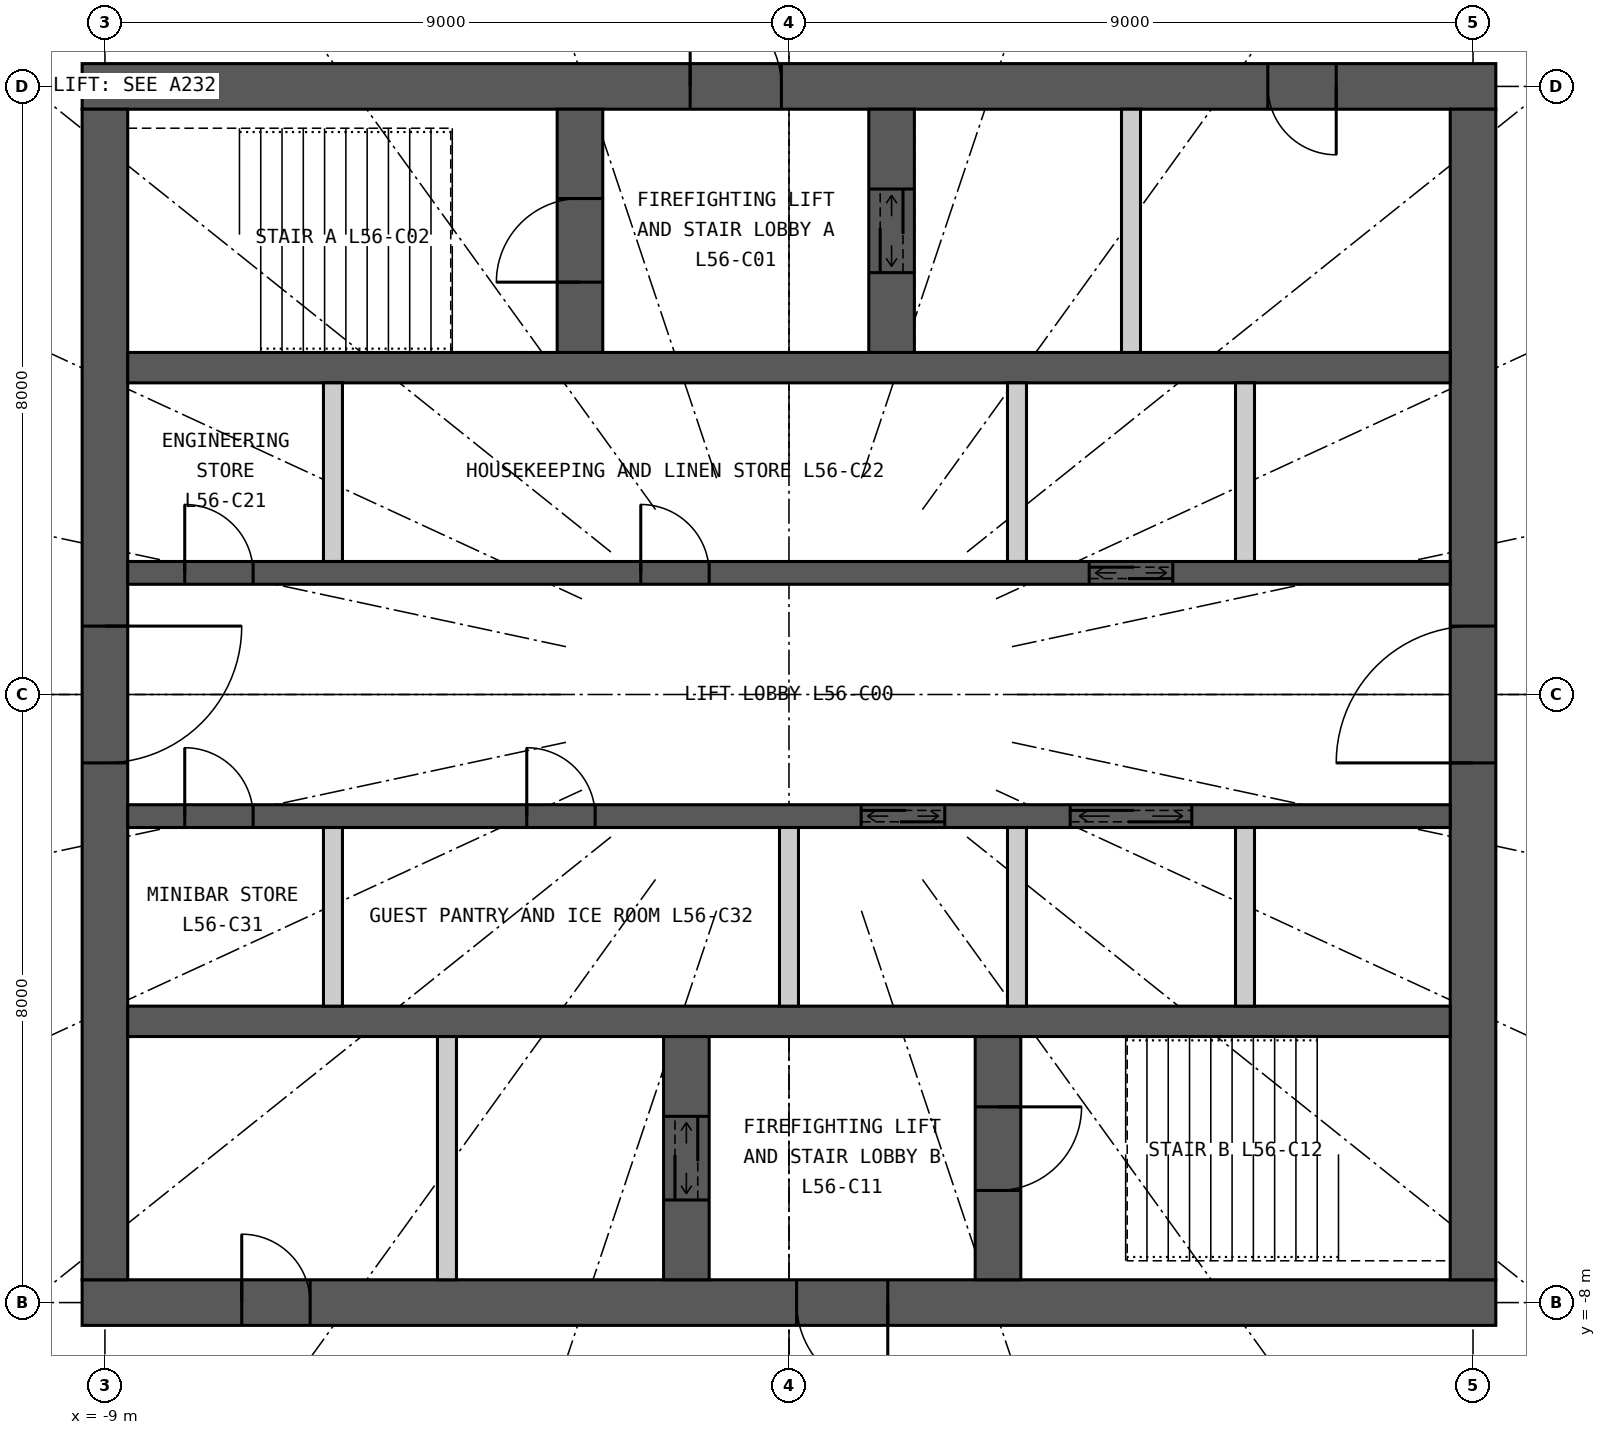
"""IFC4 building model, lengths in metres.
Left out: names, types, materials, properties, quantities, classifications, styles, units other than length and angle.
Written with IfcOpenShell. Run it as: python <this file> out.ifc"""

import sys

from ifc_helpers import new_model, si_unit, direction, frame, frame_2d, origin, place, context, subcontext, project, spatial, rectangle, extrude, element, fill, save


model = new_model("IFC4")
c1 = context("Model", 3, precision=1e-05, world=origin(), true_north=direction((0.0, 1.0)))
c2 = subcontext(c1, "Body", "Model", "MODEL_VIEW")
j1 = project(units=[si_unit("LENGTHUNIT", "METRE"), si_unit("PLANEANGLEUNIT", "RADIAN")], contexts=[c1])
p1 = place(None, origin())
s1 = spatial("IfcSite", under=j1, at=p1, CompositionType="ELEMENT")
p2 = place(p1, origin())
s2 = spatial("IfcBuilding", under=s1, at=p2, CompositionType="ELEMENT")
p3 = place(p2, frame((0.0, 0.0, 209.4)))
s3 = spatial("IfcBuildingStorey", under=s2, at=p3, CompositionType="ELEMENT", Elevation=209.4)
p4 = place(p3, frame((-9.3, 8.0, 0.0), z_axis=(0.0, 0.0, 1.0), x_axis=(1.0, 0.0, 0.0)))
e1 = element("IfcWall", 1, at=p4, inside=s3, PredefinedType="SHEAR", context=c2, shape_type="SweptSolid", body=[
    extrude(rectangle(XDim=18.6, YDim=0.6, at=frame_2d((9.3, 0.0))), origin(), (0.0, 0.0, 1.0), 3.3),
])
p5 = place(p4, frame((8.0, 0.0, 0.0)))
e2 = element("IfcOpeningElement", 2, at=p5, cuts=e1, PredefinedType="OPENING", context=c2, shape_type="SweptSolid", body=[
    extrude(rectangle(XDim=1.2, YDim=2.2, at=frame_2d((0.6, 1.1))), frame((0.0, 0.31, 0.0), z_axis=(0.0, -1.0, 0.0), x_axis=(1.0, 0.0, 0.0)), (0.0, 0.0, 1.0), 0.62),
])
p6 = place(p4, frame((15.6, 0.0, 0.0)))
e3 = element("IfcOpeningElement", 3, at=p6, cuts=e1, PredefinedType="OPENING", context=c2, shape_type="SweptSolid", body=[
    extrude(rectangle(XDim=0.9, YDim=2.2, at=frame_2d((0.45, 1.1))), frame((0.0, 0.31, 0.0), z_axis=(0.0, -1.0, 0.0), x_axis=(1.0, 0.0, 0.0)), (0.0, 0.0, 1.0), 0.62),
])
p7 = place(p3, frame((9.3, -8.0, 0.0), z_axis=(0.0, 0.0, 1.0), x_axis=(-1.0, 0.0, 0.0)))
e4 = element("IfcWall", 4, at=p7, inside=s3, PredefinedType="SHEAR", context=c2, shape_type="SweptSolid", body=[
    extrude(rectangle(XDim=18.6, YDim=0.6, at=frame_2d((9.3, 0.0))), origin(), (0.0, 0.0, 1.0), 3.3),
])
p8 = place(p7, frame((8.0, 0.0, 0.0)))
e5 = element("IfcOpeningElement", 5, at=p8, cuts=e4, PredefinedType="OPENING", context=c2, shape_type="SweptSolid", body=[
    extrude(rectangle(XDim=1.2, YDim=2.2, at=frame_2d((0.6, 1.1))), frame((0.0, 0.31, 0.0), z_axis=(0.0, -1.0, 0.0), x_axis=(1.0, 0.0, 0.0)), (0.0, 0.0, 1.0), 0.62),
])
p9 = place(p7, frame((15.6, 0.0, 0.0)))
e6 = element("IfcOpeningElement", 6, at=p9, cuts=e4, PredefinedType="OPENING", context=c2, shape_type="SweptSolid", body=[
    extrude(rectangle(XDim=0.9, YDim=2.2, at=frame_2d((0.45, 1.1))), frame((0.0, 0.31, 0.0), z_axis=(0.0, -1.0, 0.0), x_axis=(1.0, 0.0, 0.0)), (0.0, 0.0, 1.0), 0.62),
])
p10 = place(p3, frame((9.0, -7.7, 0.0), z_axis=(0.0, 0.0, 1.0), x_axis=(0.0, 1.0, 0.0)))
e7 = element("IfcWall", 7, at=p10, inside=s3, PredefinedType="SHEAR", context=c2, shape_type="SweptSolid", body=[
    extrude(rectangle(XDim=15.4, YDim=0.6, at=frame_2d((7.7, 0.0))), origin(), (0.0, 0.0, 1.0), 3.3),
])
p11 = place(p10, frame((6.8, 0.0, 0.0)))
e8 = element("IfcOpeningElement", 8, at=p11, cuts=e7, PredefinedType="OPENING", context=c2, shape_type="SweptSolid", body=[
    extrude(rectangle(XDim=1.8, YDim=2.2, at=frame_2d((0.9, 1.1))), frame((0.0, 0.31, 0.0), z_axis=(0.0, -1.0, 0.0), x_axis=(1.0, 0.0, 0.0)), (0.0, 0.0, 1.0), 0.62),
])
p12 = place(p3, frame((-9.0, 7.7, 0.0), z_axis=(0.0, 0.0, 1.0), x_axis=(0.0, -1.0, 0.0)))
e9 = element("IfcWall", 9, at=p12, inside=s3, PredefinedType="SHEAR", context=c2, shape_type="SweptSolid", body=[
    extrude(rectangle(XDim=15.4, YDim=0.6, at=frame_2d((7.7, 0.0))), origin(), (0.0, 0.0, 1.0), 3.3),
])
p13 = place(p12, frame((6.8, 0.0, 0.0)))
e10 = element("IfcOpeningElement", 10, at=p13, cuts=e9, PredefinedType="OPENING", context=c2, shape_type="SweptSolid", body=[
    extrude(rectangle(XDim=1.8, YDim=2.2, at=frame_2d((0.9, 1.1))), frame((0.0, 0.31, 0.0), z_axis=(0.0, -1.0, 0.0), x_axis=(1.0, 0.0, 0.0)), (0.0, 0.0, 1.0), 0.62),
])
p14 = place(p3, frame((-8.7, 4.3, 0.0), z_axis=(0.0, 0.0, 1.0), x_axis=(1.0, 0.0, 0.0)))
e11 = element("IfcWall", 11, at=p14, inside=s3, PredefinedType="SHEAR", context=c2, shape_type="SweptSolid", body=[
    extrude(rectangle(XDim=17.4, YDim=0.4, at=frame_2d((8.7, 0.0))), origin(), (0.0, 0.0, 1.0), 3.3),
])
p15 = place(p3, frame((-8.7, 1.6, 0.0), z_axis=(0.0, 0.0, 1.0), x_axis=(1.0, 0.0, 0.0)))
e12 = element("IfcWall", 12, at=p15, inside=s3, PredefinedType="SHEAR", context=c2, shape_type="SweptSolid", body=[
    extrude(rectangle(XDim=17.4, YDim=0.3, at=frame_2d((8.7, 0.0))), origin(), (0.0, 0.0, 1.0), 3.3),
])
p16 = place(p15, frame((12.65, 0.0, 0.0)))
e13 = element("IfcOpeningElement", 13, at=p16, cuts=e12, PredefinedType="OPENING", context=c2, shape_type="SweptSolid", body=[
    extrude(rectangle(XDim=1.1, YDim=2.2, at=frame_2d((0.55, 1.1))), frame((0.0, 0.16, 0.0), z_axis=(0.0, -1.0, 0.0), x_axis=(1.0, 0.0, 0.0)), (0.0, 0.0, 1.0), 0.32),
])
p17 = place(p15, frame((0.75, 0.0, 0.0)))
e14 = element("IfcOpeningElement", 14, at=p17, cuts=e12, PredefinedType="OPENING", context=c2, shape_type="SweptSolid", body=[
    extrude(rectangle(XDim=0.9, YDim=2.2, at=frame_2d((0.45, 1.1))), frame((0.0, 0.16, 0.0), z_axis=(0.0, -1.0, 0.0), x_axis=(1.0, 0.0, 0.0)), (0.0, 0.0, 1.0), 0.32),
])
p18 = place(p15, frame((6.75, 0.0, 0.0)))
e15 = element("IfcOpeningElement", 15, at=p18, cuts=e12, PredefinedType="OPENING", context=c2, shape_type="SweptSolid", body=[
    extrude(rectangle(XDim=0.9, YDim=2.2, at=frame_2d((0.45, 1.1))), frame((0.0, 0.16, 0.0), z_axis=(0.0, -1.0, 0.0), x_axis=(1.0, 0.0, 0.0)), (0.0, 0.0, 1.0), 0.32),
])
p19 = place(p3, frame((-8.7, -4.3, 0.0), z_axis=(0.0, 0.0, 1.0), x_axis=(1.0, 0.0, 0.0)))
e16 = element("IfcWall", 16, at=p19, inside=s3, PredefinedType="SHEAR", context=c2, shape_type="SweptSolid", body=[
    extrude(rectangle(XDim=17.4, YDim=0.4, at=frame_2d((8.7, 0.0))), origin(), (0.0, 0.0, 1.0), 3.3),
])
p20 = place(p3, frame((-8.7, -1.6, 0.0), z_axis=(0.0, 0.0, 1.0), x_axis=(1.0, 0.0, 0.0)))
e17 = element("IfcWall", 17, at=p20, inside=s3, PredefinedType="SHEAR", context=c2, shape_type="SweptSolid", body=[
    extrude(rectangle(XDim=17.4, YDim=0.3, at=frame_2d((8.7, 0.0))), origin(), (0.0, 0.0, 1.0), 3.3),
])
p21 = place(p20, frame((9.65, 0.0, 0.0)))
e18 = element("IfcOpeningElement", 18, at=p21, cuts=e17, PredefinedType="OPENING", context=c2, shape_type="SweptSolid", body=[
    extrude(rectangle(XDim=1.1, YDim=2.2, at=frame_2d((0.55, 1.1))), frame((0.0, 0.16, 0.0), z_axis=(0.0, -1.0, 0.0), x_axis=(1.0, 0.0, 0.0)), (0.0, 0.0, 1.0), 0.32),
])
p22 = place(p20, frame((12.4, 0.0, 0.0)))
e19 = element("IfcOpeningElement", 19, at=p22, cuts=e17, PredefinedType="OPENING", context=c2, shape_type="SweptSolid", body=[
    extrude(rectangle(XDim=1.6, YDim=2.4, at=frame_2d((0.8, 1.2))), frame((0.0, 0.16, 0.0), z_axis=(0.0, -1.0, 0.0), x_axis=(1.0, 0.0, 0.0)), (0.0, 0.0, 1.0), 0.32),
])
p23 = place(p20, frame((0.75, 0.0, 0.0)))
e20 = element("IfcOpeningElement", 20, at=p23, cuts=e17, PredefinedType="OPENING", context=c2, shape_type="SweptSolid", body=[
    extrude(rectangle(XDim=0.9, YDim=2.2, at=frame_2d((0.45, 1.1))), frame((0.0, 0.16, 0.0), z_axis=(0.0, -1.0, 0.0), x_axis=(1.0, 0.0, 0.0)), (0.0, 0.0, 1.0), 0.32),
])
p24 = place(p20, frame((5.25, 0.0, 0.0)))
e21 = element("IfcOpeningElement", 21, at=p24, cuts=e17, PredefinedType="OPENING", context=c2, shape_type="SweptSolid", body=[
    extrude(rectangle(XDim=0.9, YDim=2.2, at=frame_2d((0.45, 1.1))), frame((0.0, 0.16, 0.0), z_axis=(0.0, -1.0, 0.0), x_axis=(1.0, 0.0, 0.0)), (0.0, 0.0, 1.0), 0.32),
])
p25 = place(p3, frame((-2.75, 4.5, 0.0), z_axis=(0.0, 0.0, 1.0), x_axis=(0.0, 1.0, 0.0)))
e22 = element("IfcWall", 22, at=p25, inside=s3, PredefinedType="SHEAR", context=c2, shape_type="SweptSolid", body=[
    extrude(rectangle(XDim=3.2, YDim=0.6, at=frame_2d((1.6, 0.0))), origin(), (0.0, 0.0, 1.0), 3.3),
])
p26 = place(p25, frame((0.925, 0.0, 0.0)))
e23 = element("IfcOpeningElement", 23, at=p26, cuts=e22, PredefinedType="OPENING", context=c2, shape_type="SweptSolid", body=[
    extrude(rectangle(XDim=1.1, YDim=2.2, at=frame_2d((0.55, 1.1))), frame((0.0, 0.31, 0.0), z_axis=(0.0, -1.0, 0.0), x_axis=(1.0, 0.0, 0.0)), (0.0, 0.0, 1.0), 0.62),
])
p27 = place(p3, frame((1.35, 4.5, 0.0), z_axis=(0.0, 0.0, 1.0), x_axis=(0.0, 1.0, 0.0)))
e24 = element("IfcWall", 24, at=p27, inside=s3, PredefinedType="SHEAR", context=c2, shape_type="SweptSolid", body=[
    extrude(rectangle(XDim=3.2, YDim=0.6, at=frame_2d((1.6, 0.0))), origin(), (0.0, 0.0, 1.0), 3.3),
])
p28 = place(p27, frame((1.05, 0.0, 0.0)))
e25 = element("IfcOpeningElement", 25, at=p28, cuts=e24, PredefinedType="OPENING", context=c2, shape_type="SweptSolid", body=[
    extrude(rectangle(XDim=1.1, YDim=2.2, at=frame_2d((0.55, 1.1))), frame((0.0, 0.31, 0.0), z_axis=(0.0, -1.0, 0.0), x_axis=(1.0, 0.0, 0.0)), (0.0, 0.0, 1.0), 0.62),
])
p29 = place(p3, frame((4.5, 4.5, 0.0), z_axis=(0.0, 0.0, 1.0), x_axis=(0.0, 1.0, 0.0)))
e26 = element("IfcWall", 26, at=p29, inside=s3, PredefinedType="PARTITIONING", context=c2, shape_type="SweptSolid", body=[
    extrude(rectangle(XDim=3.2, YDim=0.25, at=frame_2d((1.6, 0.0))), origin(), (0.0, 0.0, 1.0), 3.3),
])
p30 = place(p3, frame((2.75, -7.7, 0.0), z_axis=(0.0, 0.0, 1.0), x_axis=(0.0, 1.0, 0.0)))
e27 = element("IfcWall", 27, at=p30, inside=s3, PredefinedType="SHEAR", context=c2, shape_type="SweptSolid", body=[
    extrude(rectangle(XDim=3.2, YDim=0.6, at=frame_2d((1.6, 0.0))), origin(), (0.0, 0.0, 1.0), 3.3),
])
p31 = place(p30, frame((1.175, 0.0, 0.0)))
e28 = element("IfcOpeningElement", 28, at=p31, cuts=e27, PredefinedType="OPENING", context=c2, shape_type="SweptSolid", body=[
    extrude(rectangle(XDim=1.1, YDim=2.2, at=frame_2d((0.55, 1.1))), frame((0.0, 0.31, 0.0), z_axis=(0.0, -1.0, 0.0), x_axis=(1.0, 0.0, 0.0)), (0.0, 0.0, 1.0), 0.62),
])
p32 = place(p3, frame((-1.35, -7.7, 0.0), z_axis=(0.0, 0.0, 1.0), x_axis=(0.0, 1.0, 0.0)))
e29 = element("IfcWall", 29, at=p32, inside=s3, PredefinedType="SHEAR", context=c2, shape_type="SweptSolid", body=[
    extrude(rectangle(XDim=3.2, YDim=0.6, at=frame_2d((1.6, 0.0))), origin(), (0.0, 0.0, 1.0), 3.3),
])
p33 = place(p32, frame((1.05, 0.0, 0.0)))
e30 = element("IfcOpeningElement", 30, at=p33, cuts=e29, PredefinedType="OPENING", context=c2, shape_type="SweptSolid", body=[
    extrude(rectangle(XDim=1.1, YDim=2.2, at=frame_2d((0.55, 1.1))), frame((0.0, 0.31, 0.0), z_axis=(0.0, -1.0, 0.0), x_axis=(1.0, 0.0, 0.0)), (0.0, 0.0, 1.0), 0.62),
])
p34 = place(p3, frame((-4.5, -7.7, 0.0), z_axis=(0.0, 0.0, 1.0), x_axis=(0.0, 1.0, 0.0)))
e31 = element("IfcWall", 31, at=p34, inside=s3, PredefinedType="PARTITIONING", context=c2, shape_type="SweptSolid", body=[
    extrude(rectangle(XDim=3.2, YDim=0.25, at=frame_2d((1.6, 0.0))), origin(), (0.0, 0.0, 1.0), 3.3),
])
for number, where, z_axis, x_axis in (
    (32, (-6.0, 1.75, 0.0), (0.0, 0.0, 1.0), (0.0, 1.0, 0.0)),
    (33, (3.0, 1.75, 0.0), (0.0, 0.0, 1.0), (0.0, 1.0, 0.0)),
    (34, (6.0, 1.75, 0.0), (0.0, 0.0, 1.0), (0.0, 1.0, 0.0)),
    (35, (-6.0, -4.1, 0.0), (0.0, 0.0, 1.0), (0.0, 1.0, 0.0)),
    (36, (0.0, -4.1, 0.0), (0.0, 0.0, 1.0), (0.0, 1.0, 0.0)),
    (37, (3.0, -4.1, 0.0), (0.0, 0.0, 1.0), (0.0, 1.0, 0.0)),
    (38, (6.0, -4.1, 0.0), (0.0, 0.0, 1.0), (0.0, 1.0, 0.0)),
):
    element("IfcWall", number, at=place(p3, frame(where, z_axis=z_axis, x_axis=x_axis)), inside=s3, PredefinedType="PARTITIONING", context=c2, shape_type="SweptSolid", body=[
        extrude(rectangle(XDim=2.35, YDim=0.25, at=frame_2d((1.175, 0.0))), origin(), (0.0, 0.0, 1.0), 3.3),
    ])
p35 = place(p5, origin())
e39 = element("IfcDoor", 39, at=p35, inside=s3, OperationType="SINGLE_SWING_LEFT", PredefinedType="DOOR", context=c2, shape_type="SweptSolid", body=[
    extrude(rectangle(XDim=1.2, YDim=2.2, at=frame_2d((0.6, 1.1))), frame((0.0, 0.025, 0.0), z_axis=(0.0, -1.0, 0.0), x_axis=(1.0, 0.0, 0.0)), (0.0, 0.0, 1.0), 0.05),
])
fill(e2, e39)
p36 = place(p26, origin())
e40 = element("IfcDoor", 40, at=p36, inside=s3, OperationType="SINGLE_SWING_LEFT", PredefinedType="DOOR", context=c2, shape_type="SweptSolid", body=[
    extrude(rectangle(XDim=1.1, YDim=2.2, at=frame_2d((0.55, 1.1))), frame((0.0, 0.025, 0.0), z_axis=(0.0, -1.0, 0.0), x_axis=(1.0, 0.0, 0.0)), (0.0, 0.0, 1.0), 0.05),
])
fill(e23, e40)
p37 = place(p28, origin())
e41 = element("IfcDoor", 41, at=p37, inside=s3, OperationType="DOUBLE_DOOR_SLIDING", PredefinedType="DOOR", context=c2, shape_type="SweptSolid", body=[
    extrude(rectangle(XDim=1.1, YDim=2.2, at=frame_2d((0.55, 1.1))), frame((0.0, 0.025, 0.0), z_axis=(0.0, -1.0, 0.0), x_axis=(1.0, 0.0, 0.0)), (0.0, 0.0, 1.0), 0.05),
])
fill(e25, e41)
p38 = place(p6, origin())
e42 = element("IfcDoor", 42, at=p38, inside=s3, OperationType="SINGLE_SWING_RIGHT", PredefinedType="DOOR", context=c2, shape_type="SweptSolid", body=[
    extrude(rectangle(XDim=0.9, YDim=2.2, at=frame_2d((0.45, 1.1))), frame((0.0, 0.025, 0.0), z_axis=(0.0, -1.0, 0.0), x_axis=(1.0, 0.0, 0.0)), (0.0, 0.0, 1.0), 0.05),
])
fill(e3, e42)
p39 = place(p8, origin())
e43 = element("IfcDoor", 43, at=p39, inside=s3, OperationType="SINGLE_SWING_LEFT", PredefinedType="DOOR", context=c2, shape_type="SweptSolid", body=[
    extrude(rectangle(XDim=1.2, YDim=2.2, at=frame_2d((0.6, 1.1))), frame((0.0, 0.025, 0.0), z_axis=(0.0, -1.0, 0.0), x_axis=(1.0, 0.0, 0.0)), (0.0, 0.0, 1.0), 0.05),
])
fill(e5, e43)
p40 = place(p31, origin())
e44 = element("IfcDoor", 44, at=p40, inside=s3, OperationType="SINGLE_SWING_RIGHT", PredefinedType="DOOR", context=c2, shape_type="SweptSolid", body=[
    extrude(rectangle(XDim=1.1, YDim=2.2, at=frame_2d((0.55, 1.1))), frame((0.0, 0.025, 0.0), z_axis=(0.0, -1.0, 0.0), x_axis=(1.0, 0.0, 0.0)), (0.0, 0.0, 1.0), 0.05),
])
fill(e28, e44)
p41 = place(p33, origin())
e45 = element("IfcDoor", 45, at=p41, inside=s3, OperationType="DOUBLE_DOOR_SLIDING", PredefinedType="DOOR", context=c2, shape_type="SweptSolid", body=[
    extrude(rectangle(XDim=1.1, YDim=2.2, at=frame_2d((0.55, 1.1))), frame((0.0, 0.025, 0.0), z_axis=(0.0, -1.0, 0.0), x_axis=(1.0, 0.0, 0.0)), (0.0, 0.0, 1.0), 0.05),
])
fill(e30, e45)
p42 = place(p9, origin())
e46 = element("IfcDoor", 46, at=p42, inside=s3, OperationType="SINGLE_SWING_RIGHT", PredefinedType="DOOR", context=c2, shape_type="SweptSolid", body=[
    extrude(rectangle(XDim=0.9, YDim=2.2, at=frame_2d((0.45, 1.1))), frame((0.0, 0.025, 0.0), z_axis=(0.0, -1.0, 0.0), x_axis=(1.0, 0.0, 0.0)), (0.0, 0.0, 1.0), 0.05),
])
fill(e6, e46)
p43 = place(p16, origin())
e47 = element("IfcDoor", 47, at=p43, inside=s3, OperationType="DOUBLE_DOOR_SLIDING", PredefinedType="DOOR", context=c2, shape_type="SweptSolid", body=[
    extrude(rectangle(XDim=1.1, YDim=2.2, at=frame_2d((0.55, 1.1))), frame((0.0, 0.025, 0.0), z_axis=(0.0, -1.0, 0.0), x_axis=(1.0, 0.0, 0.0)), (0.0, 0.0, 1.0), 0.05),
])
fill(e13, e47)
p44 = place(p21, origin())
e48 = element("IfcDoor", 48, at=p44, inside=s3, OperationType="DOUBLE_DOOR_SLIDING", PredefinedType="DOOR", context=c2, shape_type="SweptSolid", body=[
    extrude(rectangle(XDim=1.1, YDim=2.2, at=frame_2d((0.55, 1.1))), frame((0.0, 0.025, 0.0), z_axis=(0.0, -1.0, 0.0), x_axis=(1.0, 0.0, 0.0)), (0.0, 0.0, 1.0), 0.05),
])
fill(e18, e48)
p45 = place(p22, origin())
e49 = element("IfcDoor", 49, at=p45, inside=s3, OperationType="DOUBLE_DOOR_SLIDING", PredefinedType="DOOR", context=c2, shape_type="SweptSolid", body=[
    extrude(rectangle(XDim=1.6, YDim=2.4, at=frame_2d((0.8, 1.2))), frame((0.0, 0.025, 0.0), z_axis=(0.0, -1.0, 0.0), x_axis=(1.0, 0.0, 0.0)), (0.0, 0.0, 1.0), 0.05),
])
fill(e19, e49)
p46 = place(p17, origin())
e50 = element("IfcDoor", 50, at=p46, inside=s3, OperationType="SINGLE_SWING_LEFT", PredefinedType="DOOR", context=c2, shape_type="SweptSolid", body=[
    extrude(rectangle(XDim=0.9, YDim=2.2, at=frame_2d((0.45, 1.1))), frame((0.0, 0.025, 0.0), z_axis=(0.0, -1.0, 0.0), x_axis=(1.0, 0.0, 0.0)), (0.0, 0.0, 1.0), 0.05),
])
fill(e14, e50)
p47 = place(p18, origin())
e51 = element("IfcDoor", 51, at=p47, inside=s3, OperationType="SINGLE_SWING_LEFT", PredefinedType="DOOR", context=c2, shape_type="SweptSolid", body=[
    extrude(rectangle(XDim=0.9, YDim=2.2, at=frame_2d((0.45, 1.1))), frame((0.0, 0.025, 0.0), z_axis=(0.0, -1.0, 0.0), x_axis=(1.0, 0.0, 0.0)), (0.0, 0.0, 1.0), 0.05),
])
fill(e15, e51)
p48 = place(p23, origin())
e52 = element("IfcDoor", 52, at=p48, inside=s3, OperationType="SINGLE_SWING_LEFT", PredefinedType="DOOR", context=c2, shape_type="SweptSolid", body=[
    extrude(rectangle(XDim=0.9, YDim=2.2, at=frame_2d((0.45, 1.1))), frame((0.0, 0.025, 0.0), z_axis=(0.0, -1.0, 0.0), x_axis=(1.0, 0.0, 0.0)), (0.0, 0.0, 1.0), 0.05),
])
fill(e20, e52)
p49 = place(p24, origin())
e53 = element("IfcDoor", 53, at=p49, inside=s3, OperationType="SINGLE_SWING_LEFT", PredefinedType="DOOR", context=c2, shape_type="SweptSolid", body=[
    extrude(rectangle(XDim=0.9, YDim=2.2, at=frame_2d((0.45, 1.1))), frame((0.0, 0.025, 0.0), z_axis=(0.0, -1.0, 0.0), x_axis=(1.0, 0.0, 0.0)), (0.0, 0.0, 1.0), 0.05),
])
fill(e21, e53)
p50 = place(p11, origin())
e54 = element("IfcDoor", 54, at=p50, inside=s3, OperationType="DOUBLE_DOOR_DOUBLE_SWING", PredefinedType="DOOR", context=c2, shape_type="SweptSolid", body=[
    extrude(rectangle(XDim=1.8, YDim=2.2, at=frame_2d((0.9, 1.1))), frame((0.0, 0.025, 0.0), z_axis=(0.0, -1.0, 0.0), x_axis=(1.0, 0.0, 0.0)), (0.0, 0.0, 1.0), 0.05),
])
fill(e8, e54)
p51 = place(p13, origin())
e55 = element("IfcDoor", 55, at=p51, inside=s3, OperationType="DOUBLE_DOOR_DOUBLE_SWING", PredefinedType="DOOR", context=c2, shape_type="SweptSolid", body=[
    extrude(rectangle(XDim=1.8, YDim=2.2, at=frame_2d((0.9, 1.1))), frame((0.0, 0.025, 0.0), z_axis=(0.0, -1.0, 0.0), x_axis=(1.0, 0.0, 0.0)), (0.0, 0.0, 1.0), 0.05),
])
fill(e10, e55)
save(model, sys.argv[1])
